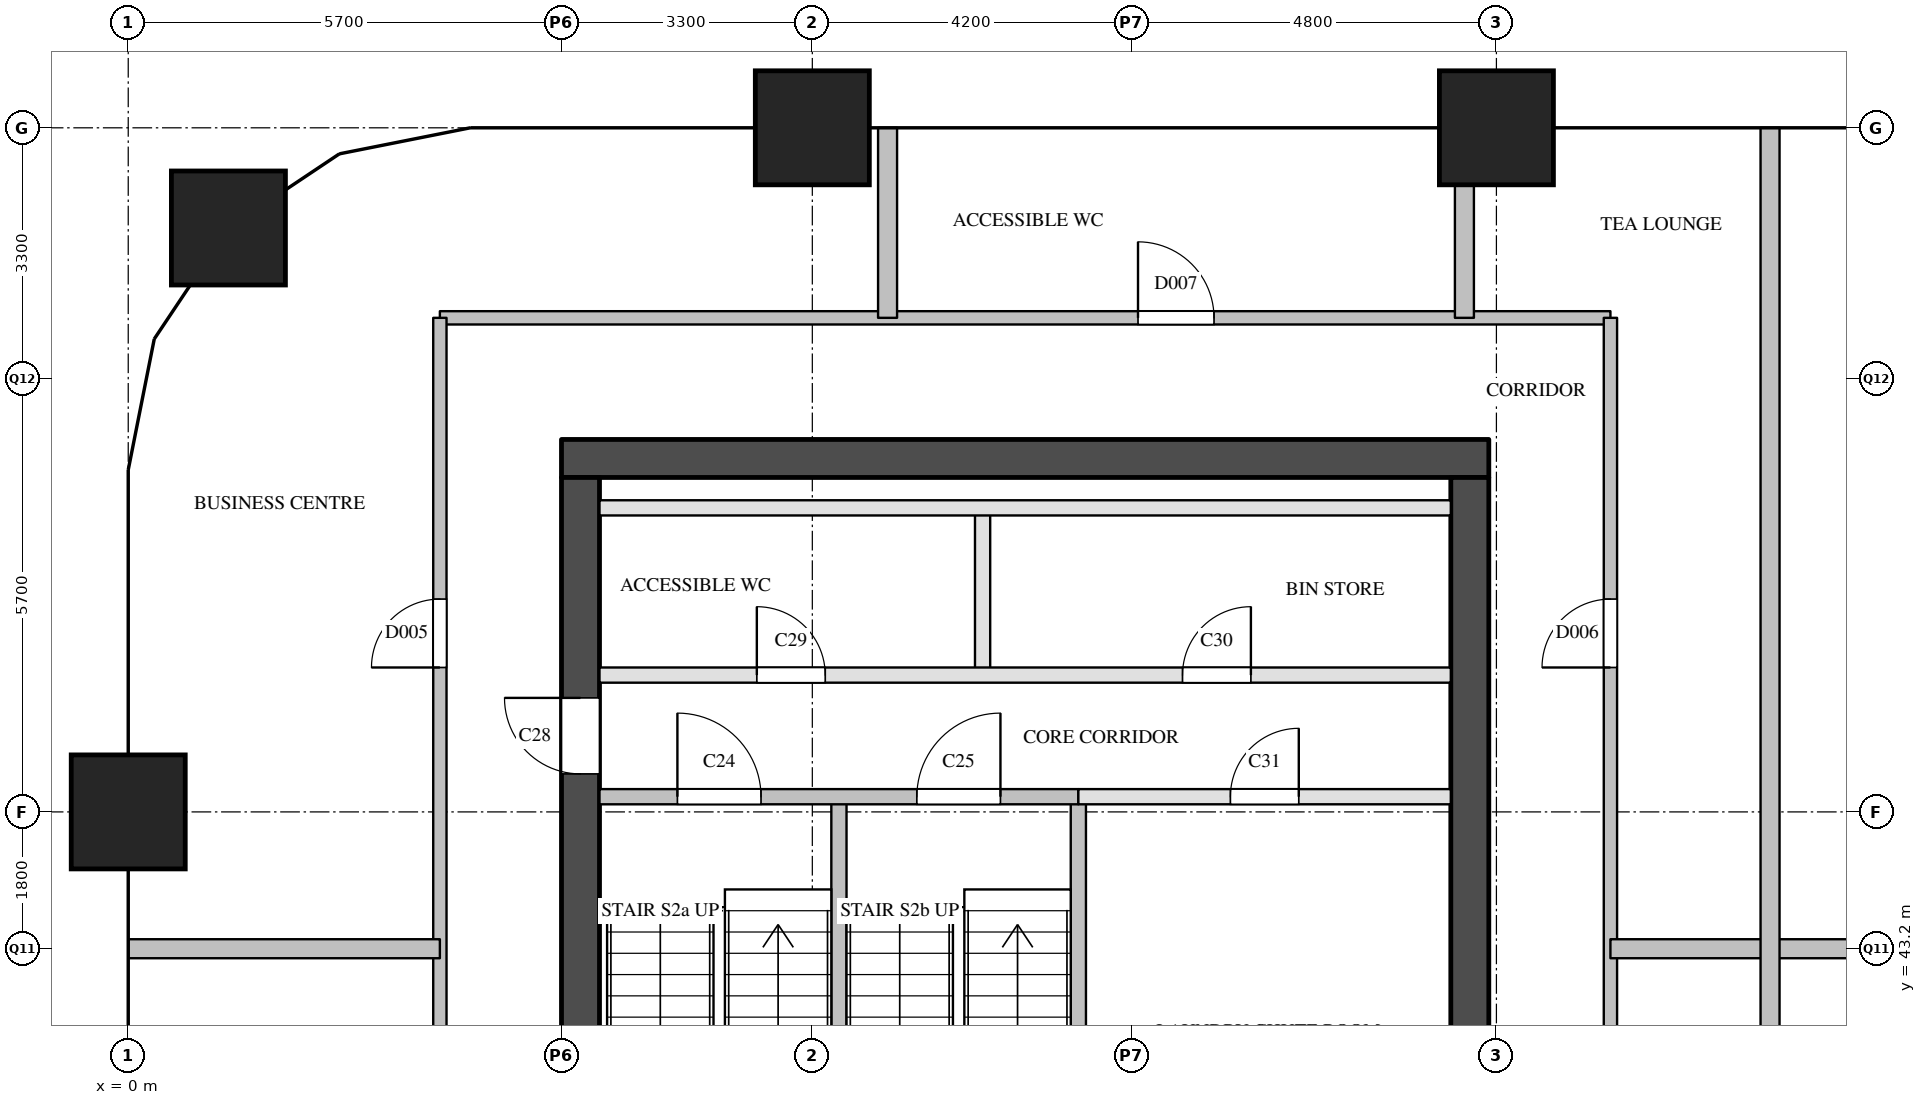
"""IFC4 building model, lengths in metres.
Left out: names, types, materials, properties, quantities, classifications, styles, units other than length and angle.
Written with IfcOpenShell. Run it as: python <this file> out.ifc"""

import sys

from ifc_helpers import new_model, si_unit, direction, frame, frame_2d, origin, origin_2d, place, context, subcontext, project, spatial, rectangle, extrude, element, fill, save


model = new_model("IFC4")
c1 = context("Model", 3, precision=1e-05, world=origin(), true_north=direction((0.0, 1.0)))
c2 = subcontext(c1, "Body", "Model", "MODEL_VIEW")
j1 = project(units=[si_unit("LENGTHUNIT", "METRE"), si_unit("PLANEANGLEUNIT", "RADIAN")], contexts=[c1])
p1 = place(None, origin())
s1 = spatial("IfcSite", under=j1, at=p1, CompositionType="ELEMENT")
p2 = place(p1, origin())
s2 = spatial("IfcBuilding", under=s1, at=p2, CompositionType="ELEMENT")
p3 = place(p2, frame((0.0, 0.0, 181.7)))
s3 = spatial("IfcBuildingStorey", under=s2, at=p3, CompositionType="ELEMENT", Elevation=181.7)
for number, where, z_axis, x_axis in (
    (1, (0.0, 45.0, 0.0), (0.0, 0.0, 1.0), (1.0, 0.0, 0.0)),
    (2, (1.318, 52.682, 0.0), (0.0, 0.0, 1.0), (1.0, 0.0, 0.0)),
    (3, (9.0, 54.0, 0.0), (0.0, 0.0, 1.0), (1.0, 0.0, 0.0)),
    (4, (18.0, 54.0, 0.0), (0.0, 0.0, 1.0), (1.0, 0.0, 0.0)),
):
    element("IfcColumn", number, at=place(p3, frame(where, z_axis=z_axis, x_axis=x_axis)), inside=s3, PredefinedType="COLUMN", context=c2, shape_type="SweptSolid", body=[
        extrude(rectangle(XDim=1.5, YDim=1.5, at=origin_2d()), origin(), (0.0, 0.0, 1.0), 3.9),
    ])
p4 = place(p3, frame((5.7, 49.65, 0.0), z_axis=(0.0, 0.0, 1.0), x_axis=(1.0, 0.0, 0.0)))
e5 = element("IfcWall", 5, at=p4, inside=s3, PredefinedType="SHEAR", context=c2, shape_type="SweptSolid", body=[
    extrude(rectangle(XDim=12.2, YDim=0.5, at=frame_2d((6.1, 0.0))), origin(), (0.0, 0.0, 1.0), 3.6),
])
p5 = place(p3, frame((5.95, 29.1, 0.0), z_axis=(0.0, 0.0, 1.0), x_axis=(0.0, 1.0, 0.0)))
e6 = element("IfcWall", 6, at=p5, inside=s3, PredefinedType="SHEAR", context=c2, shape_type="SweptSolid", body=[
    extrude(rectangle(XDim=20.3, YDim=0.5, at=frame_2d((10.15, 0.0))), origin(), (0.0, 0.0, 1.0), 3.6),
])
p6 = place(p5, frame((3.45, 0.0, 0.0)))
e7 = element("IfcOpeningElement", 7, at=p6, cuts=e6, PredefinedType="OPENING", context=c2, shape_type="SweptSolid", body=[
    extrude(rectangle(XDim=1.0, YDim=2.1, at=frame_2d((0.5, 1.05))), frame((0.0, 0.26, 0.0), z_axis=(0.0, -1.0, 0.0), x_axis=(1.0, 0.0, 0.0)), (0.0, 0.0, 1.0), 0.52),
])
p7 = place(p5, frame((16.4, 0.0, 0.0)))
e8 = element("IfcOpeningElement", 8, at=p7, cuts=e6, PredefinedType="OPENING", context=c2, shape_type="SweptSolid", body=[
    extrude(rectangle(XDim=1.0, YDim=2.1, at=frame_2d((0.5, 1.05))), frame((0.0, 0.26, 0.0), z_axis=(0.0, -1.0, 0.0), x_axis=(1.0, 0.0, 0.0)), (0.0, 0.0, 1.0), 0.52),
])
p8 = place(p3, frame((17.65, 29.1, 0.0), z_axis=(0.0, 0.0, 1.0), x_axis=(0.0, 1.0, 0.0)))
e9 = element("IfcWall", 9, at=p8, inside=s3, PredefinedType="SHEAR", context=c2, shape_type="SweptSolid", body=[
    extrude(rectangle(XDim=20.3, YDim=0.5, at=frame_2d((10.15, 0.0))), origin(), (0.0, 0.0, 1.0), 3.6),
])
p9 = place(p8, frame((1.25, 0.0, 0.0)))
e10 = element("IfcOpeningElement", 10, at=p9, cuts=e9, PredefinedType="OPENING", context=c2, shape_type="SweptSolid", body=[
    extrude(rectangle(XDim=0.7, YDim=2.1, at=frame_2d((0.35, 1.05))), frame((0.0, 0.26, 0.0), z_axis=(0.0, -1.0, 0.0), x_axis=(1.0, 0.0, 0.0)), (0.0, 0.0, 1.0), 0.52),
])
p10 = place(p8, frame((7.05, 0.0, 0.0)))
e11 = element("IfcOpeningElement", 11, at=p10, cuts=e9, PredefinedType="OPENING", context=c2, shape_type="SweptSolid", body=[
    extrude(rectangle(XDim=0.7, YDim=2.1, at=frame_2d((0.35, 1.05))), frame((0.0, 0.26, 0.0), z_axis=(0.0, -1.0, 0.0), x_axis=(1.0, 0.0, 0.0)), (0.0, 0.0, 1.0), 0.52),
])
p11 = place(p8, frame((3.6, 0.0, 0.0)))
e12 = element("IfcOpeningElement", 12, at=p11, cuts=e9, PredefinedType="OPENING", context=c2, shape_type="SweptSolid", body=[
    extrude(rectangle(XDim=1.8, YDim=2.1, at=frame_2d((0.9, 1.05))), frame((0.0, 0.26, 0.0), z_axis=(0.0, -1.0, 0.0), x_axis=(1.0, 0.0, 0.0)), (0.0, 0.0, 1.0), 0.52),
])
p12 = place(p3, frame((9.35, 40.9, 0.0), z_axis=(0.0, 0.0, 1.0), x_axis=(0.0, 1.0, 0.0)))
e13 = element("IfcWall", 13, at=p12, inside=s3, PredefinedType="SOLIDWALL", context=c2, shape_type="SweptSolid", body=[
    extrude(rectangle(XDim=4.3, YDim=0.2, at=frame_2d((2.15, 0.0))), origin(), (0.0, 0.0, 1.0), 3.6),
])
p13 = place(p3, frame((11.24, 46.8, 0.0), z_axis=(0.0, 0.0, 1.0), x_axis=(0.0, 1.0, 0.0)))
e14 = element("IfcWall", 14, at=p13, inside=s3, PredefinedType="PARTITIONING", context=c2, shape_type="SweptSolid", body=[
    extrude(rectangle(XDim=2.2, YDim=0.2, at=frame_2d((1.1, 0.0))), origin(), (0.0, 0.0, 1.0), 3.6),
])
p14 = place(p3, frame((12.5, 40.9, 0.0), z_axis=(0.0, 0.0, 1.0), x_axis=(0.0, 1.0, 0.0)))
e15 = element("IfcWall", 15, at=p14, inside=s3, PredefinedType="SOLIDWALL", context=c2, shape_type="SweptSolid", body=[
    extrude(rectangle(XDim=4.3, YDim=0.2, at=frame_2d((2.15, 0.0))), origin(), (0.0, 0.0, 1.0), 3.6),
])
p15 = place(p3, frame((12.5, 45.2, 0.0), z_axis=(0.0, 0.0, 1.0), x_axis=(1.0, 0.0, 0.0)))
e16 = element("IfcWall", 16, at=p15, inside=s3, PredefinedType="PARTITIONING", context=c2, shape_type="SweptSolid", body=[
    extrude(rectangle(XDim=4.9, YDim=0.2, at=frame_2d((2.45, 0.0))), origin(), (0.0, 0.0, 1.0), 3.6),
])
p16 = place(p15, frame((2.0, 0.0, 0.0)))
e17 = element("IfcOpeningElement", 17, at=p16, cuts=e16, PredefinedType="OPENING", context=c2, shape_type="SweptSolid", body=[
    extrude(rectangle(XDim=0.9, YDim=2.1, at=frame_2d((0.45, 1.05))), frame((0.0, 0.11, 0.0), z_axis=(0.0, -1.0, 0.0), x_axis=(1.0, 0.0, 0.0)), (0.0, 0.0, 1.0), 0.22),
])
p17 = place(p3, frame((6.2, 45.2, 0.0), z_axis=(0.0, 0.0, 1.0), x_axis=(1.0, 0.0, 0.0)))
e18 = element("IfcWall", 18, at=p17, inside=s3, PredefinedType="SOLIDWALL", context=c2, shape_type="SweptSolid", body=[
    extrude(rectangle(XDim=6.3, YDim=0.2, at=frame_2d((3.15, 0.0))), origin(), (0.0, 0.0, 1.0), 3.6),
])
p18 = place(p17, frame((1.025, 0.0, 0.0)))
e19 = element("IfcOpeningElement", 19, at=p18, cuts=e18, PredefinedType="OPENING", context=c2, shape_type="SweptSolid", body=[
    extrude(rectangle(XDim=1.1, YDim=2.1, at=frame_2d((0.55, 1.05))), frame((0.0, 0.11, 0.0), z_axis=(0.0, -1.0, 0.0), x_axis=(1.0, 0.0, 0.0)), (0.0, 0.0, 1.0), 0.22),
])
p19 = place(p17, frame((4.175, 0.0, 0.0)))
e20 = element("IfcOpeningElement", 20, at=p19, cuts=e18, PredefinedType="OPENING", context=c2, shape_type="SweptSolid", body=[
    extrude(rectangle(XDim=1.1, YDim=2.1, at=frame_2d((0.55, 1.05))), frame((0.0, 0.11, 0.0), z_axis=(0.0, -1.0, 0.0), x_axis=(1.0, 0.0, 0.0)), (0.0, 0.0, 1.0), 0.22),
])
p20 = place(p3, frame((6.2, 46.8, 0.0), z_axis=(0.0, 0.0, 1.0), x_axis=(1.0, 0.0, 0.0)))
e21 = element("IfcWall", 21, at=p20, inside=s3, PredefinedType="PARTITIONING", context=c2, shape_type="SweptSolid", body=[
    extrude(rectangle(XDim=11.2, YDim=0.2, at=frame_2d((5.6, 0.0))), origin(), (0.0, 0.0, 1.0), 3.6),
])
p21 = place(p20, frame((2.07, 0.0, 0.0)))
e22 = element("IfcOpeningElement", 22, at=p21, cuts=e21, PredefinedType="OPENING", context=c2, shape_type="SweptSolid", body=[
    extrude(rectangle(XDim=0.9, YDim=2.1, at=frame_2d((0.45, 1.05))), frame((0.0, 0.11, 0.0), z_axis=(0.0, -1.0, 0.0), x_axis=(1.0, 0.0, 0.0)), (0.0, 0.0, 1.0), 0.22),
])
p22 = place(p20, frame((7.67, 0.0, 0.0)))
e23 = element("IfcOpeningElement", 23, at=p22, cuts=e21, PredefinedType="OPENING", context=c2, shape_type="SweptSolid", body=[
    extrude(rectangle(XDim=0.9, YDim=2.1, at=frame_2d((0.45, 1.05))), frame((0.0, 0.11, 0.0), z_axis=(0.0, -1.0, 0.0), x_axis=(1.0, 0.0, 0.0)), (0.0, 0.0, 1.0), 0.22),
])
p23 = place(p3, frame((6.2, 49.0, 0.0), z_axis=(0.0, 0.0, 1.0), x_axis=(1.0, 0.0, 0.0)))
e24 = element("IfcWall", 24, at=p23, inside=s3, PredefinedType="PARTITIONING", context=c2, shape_type="SweptSolid", body=[
    extrude(rectangle(XDim=11.2, YDim=0.2, at=frame_2d((5.6, 0.0))), origin(), (0.0, 0.0, 1.0), 3.6),
])
p24 = place(p3, frame((4.1, 51.5, 0.0), z_axis=(0.0, 0.0, 1.0), x_axis=(1.0, 0.0, 0.0)))
e25 = element("IfcWall", 25, at=p24, inside=s3, PredefinedType="PARTITIONING", context=c2, shape_type="SweptSolid", body=[
    extrude(rectangle(XDim=15.4, YDim=0.175, at=frame_2d((7.7, 0.0))), origin(), (0.0, 0.0, 1.0), 3.6),
])
p25 = place(p24, frame((9.185, 0.0, 0.0)))
e26 = element("IfcOpeningElement", 26, at=p25, cuts=e25, PredefinedType="OPENING", context=c2, shape_type="SweptSolid", body=[
    extrude(rectangle(XDim=1.0, YDim=2.1, at=frame_2d((0.5, 1.05))), frame((0.0, 0.097, 0.0), z_axis=(0.0, -1.0, 0.0), x_axis=(1.0, 0.0, 0.0)), (0.0, 0.0, 1.0), 0.195),
])
p26 = place(p3, frame((4.1, 28.5, 0.0), z_axis=(0.0, 0.0, 1.0), x_axis=(0.0, 1.0, 0.0)))
e27 = element("IfcWall", 27, at=p26, inside=s3, PredefinedType="PARTITIONING", context=c2, shape_type="SweptSolid", body=[
    extrude(rectangle(XDim=23.0, YDim=0.175, at=frame_2d((11.5, 0.0))), origin(), (0.0, 0.0, 1.0), 3.6),
])
p27 = place(p26, frame((6.9, 0.0, 0.0)))
e28 = element("IfcOpeningElement", 28, at=p27, cuts=e27, PredefinedType="OPENING", context=c2, shape_type="SweptSolid", body=[
    extrude(rectangle(XDim=0.9, YDim=2.1, at=frame_2d((0.45, 1.05))), frame((0.0, 0.097, 0.0), z_axis=(0.0, -1.0, 0.0), x_axis=(1.0, 0.0, 0.0)), (0.0, 0.0, 1.0), 0.195),
])
p28 = place(p26, frame((18.4, 0.0, 0.0)))
e29 = element("IfcOpeningElement", 29, at=p28, cuts=e27, PredefinedType="OPENING", context=c2, shape_type="SweptSolid", body=[
    extrude(rectangle(XDim=0.9, YDim=2.1, at=frame_2d((0.45, 1.05))), frame((0.0, 0.097, 0.0), z_axis=(0.0, -1.0, 0.0), x_axis=(1.0, 0.0, 0.0)), (0.0, 0.0, 1.0), 0.195),
])
p29 = place(p3, frame((19.5, 28.5, 0.0), z_axis=(0.0, 0.0, 1.0), x_axis=(0.0, 1.0, 0.0)))
e30 = element("IfcWall", 30, at=p29, inside=s3, PredefinedType="PARTITIONING", context=c2, shape_type="SweptSolid", body=[
    extrude(rectangle(XDim=23.0, YDim=0.175, at=frame_2d((11.5, 0.0))), origin(), (0.0, 0.0, 1.0), 3.6),
])
p30 = place(p29, frame((18.4, 0.0, 0.0)))
e31 = element("IfcOpeningElement", 31, at=p30, cuts=e30, PredefinedType="OPENING", context=c2, shape_type="SweptSolid", body=[
    extrude(rectangle(XDim=0.9, YDim=2.1, at=frame_2d((0.45, 1.05))), frame((0.0, 0.097, 0.0), z_axis=(0.0, -1.0, 0.0), x_axis=(1.0, 0.0, 0.0)), (0.0, 0.0, 1.0), 0.195),
])
p31 = place(p3, frame((0.0, 43.2, 0.0), z_axis=(0.0, 0.0, 1.0), x_axis=(1.0, 0.0, 0.0)))
e32 = element("IfcWall", 32, at=p31, inside=s3, PredefinedType="PARTITIONING", context=c2, shape_type="SweptSolid", body=[
    extrude(rectangle(XDim=4.1, YDim=0.25, at=frame_2d((2.05, 0.0))), origin(), (0.0, 0.0, 1.0), 2.6),
])
p32 = place(p3, frame((19.5, 43.2, 0.0), z_axis=(0.0, 0.0, 1.0), x_axis=(1.0, 0.0, 0.0)))
e33 = element("IfcWall", 33, at=p32, inside=s3, PredefinedType="PARTITIONING", context=c2, shape_type="SweptSolid", body=[
    extrude(rectangle(XDim=15.0, YDim=0.25, at=frame_2d((7.5, 0.0))), origin(), (0.0, 0.0, 1.0), 2.6),
])
p33 = place(p3, frame((9.99, 51.5, 0.0), z_axis=(0.0, 0.0, 1.0), x_axis=(0.0, 1.0, 0.0)))
e34 = element("IfcWall", 34, at=p33, inside=s3, PredefinedType="PARTITIONING", context=c2, shape_type="SweptSolid", body=[
    extrude(rectangle(XDim=2.5, YDim=0.25, at=frame_2d((1.25, 0.0))), origin(), (0.0, 0.0, 1.0), 2.6),
])
p34 = place(p3, frame((17.579, 51.5, 0.0), z_axis=(0.0, 0.0, 1.0), x_axis=(0.0, 1.0, 0.0)))
e35 = element("IfcWall", 35, at=p34, inside=s3, PredefinedType="PARTITIONING", context=c2, shape_type="SweptSolid", body=[
    extrude(rectangle(XDim=2.5, YDim=0.25, at=frame_2d((1.25, 0.0))), origin(), (0.0, 0.0, 1.0), 3.6),
])
p35 = place(p3, frame((21.6, 27.0, 0.0), z_axis=(0.0, 0.0, 1.0), x_axis=(0.0, 1.0, 0.0)))
e36 = element("IfcWall", 36, at=p35, inside=s3, PredefinedType="PARTITIONING", context=c2, shape_type="SweptSolid", body=[
    extrude(rectangle(XDim=27.0, YDim=0.25, at=frame_2d((13.5, 0.0))), origin(), (0.0, 0.0, 1.0), 2.6),
])
p36 = place(p18, origin())
e37 = element("IfcDoor", 37, at=p36, inside=s3, OperationType="SINGLE_SWING_LEFT", PredefinedType="DOOR", context=c2, shape_type="SweptSolid", body=[
    extrude(rectangle(XDim=1.1, YDim=2.1, at=frame_2d((0.55, 1.05))), frame((0.0, 0.025, 0.0), z_axis=(0.0, -1.0, 0.0), x_axis=(1.0, 0.0, 0.0)), (0.0, 0.0, 1.0), 0.05),
])
fill(e19, e37)
p37 = place(p19, origin())
e38 = element("IfcDoor", 38, at=p37, inside=s3, OperationType="SINGLE_SWING_RIGHT", PredefinedType="DOOR", context=c2, shape_type="SweptSolid", body=[
    extrude(rectangle(XDim=1.1, YDim=2.1, at=frame_2d((0.55, 1.05))), frame((0.0, 0.025, 0.0), z_axis=(0.0, -1.0, 0.0), x_axis=(1.0, 0.0, 0.0)), (0.0, 0.0, 1.0), 0.05),
])
fill(e20, e38)
p38 = place(p7, origin())
e39 = element("IfcDoor", 39, at=p38, inside=s3, OperationType="SINGLE_SWING_RIGHT", PredefinedType="DOOR", context=c2, shape_type="SweptSolid", body=[
    extrude(rectangle(XDim=1.0, YDim=2.1, at=frame_2d((0.5, 1.05))), frame((0.0, 0.025, 0.0), z_axis=(0.0, -1.0, 0.0), x_axis=(1.0, 0.0, 0.0)), (0.0, 0.0, 1.0), 0.05),
])
fill(e8, e39)
p39 = place(p21, origin())
e40 = element("IfcDoor", 40, at=p39, inside=s3, OperationType="SINGLE_SWING_LEFT", PredefinedType="DOOR", context=c2, shape_type="SweptSolid", body=[
    extrude(rectangle(XDim=0.9, YDim=2.1, at=frame_2d((0.45, 1.05))), frame((0.0, 0.025, 0.0), z_axis=(0.0, -1.0, 0.0), x_axis=(1.0, 0.0, 0.0)), (0.0, 0.0, 1.0), 0.05),
])
fill(e22, e40)
p40 = place(p22, origin())
e41 = element("IfcDoor", 41, at=p40, inside=s3, OperationType="SINGLE_SWING_RIGHT", PredefinedType="DOOR", context=c2, shape_type="SweptSolid", body=[
    extrude(rectangle(XDim=0.9, YDim=2.1, at=frame_2d((0.45, 1.05))), frame((0.0, 0.025, 0.0), z_axis=(0.0, -1.0, 0.0), x_axis=(1.0, 0.0, 0.0)), (0.0, 0.0, 1.0), 0.05),
])
fill(e23, e41)
p41 = place(p16, origin())
e42 = element("IfcDoor", 42, at=p41, inside=s3, OperationType="SINGLE_SWING_RIGHT", PredefinedType="DOOR", context=c2, shape_type="SweptSolid", body=[
    extrude(rectangle(XDim=0.9, YDim=2.1, at=frame_2d((0.45, 1.05))), frame((0.0, 0.025, 0.0), z_axis=(0.0, -1.0, 0.0), x_axis=(1.0, 0.0, 0.0)), (0.0, 0.0, 1.0), 0.05),
])
fill(e17, e42)
p42 = place(p28, origin())
e43 = element("IfcDoor", 43, at=p42, inside=s3, OperationType="SINGLE_SWING_LEFT", PredefinedType="DOOR", context=c2, shape_type="SweptSolid", body=[
    extrude(rectangle(XDim=0.9, YDim=2.1, at=frame_2d((0.45, 1.05))), frame((0.0, 0.025, 0.0), z_axis=(0.0, -1.0, 0.0), x_axis=(1.0, 0.0, 0.0)), (0.0, 0.0, 1.0), 0.05),
])
fill(e29, e43)
p43 = place(p30, origin())
e44 = element("IfcDoor", 44, at=p43, inside=s3, OperationType="SINGLE_SWING_LEFT", PredefinedType="DOOR", context=c2, shape_type="SweptSolid", body=[
    extrude(rectangle(XDim=0.9, YDim=2.1, at=frame_2d((0.45, 1.05))), frame((0.0, 0.025, 0.0), z_axis=(0.0, -1.0, 0.0), x_axis=(1.0, 0.0, 0.0)), (0.0, 0.0, 1.0), 0.05),
])
fill(e31, e44)
p44 = place(p25, origin())
e45 = element("IfcDoor", 45, at=p44, inside=s3, OperationType="SINGLE_SWING_LEFT", PredefinedType="DOOR", context=c2, shape_type="SweptSolid", body=[
    extrude(rectangle(XDim=1.0, YDim=2.1, at=frame_2d((0.5, 1.05))), frame((0.0, 0.025, 0.0), z_axis=(0.0, -1.0, 0.0), x_axis=(1.0, 0.0, 0.0)), (0.0, 0.0, 1.0), 0.05),
])
fill(e26, e45)
save(model, sys.argv[1])
